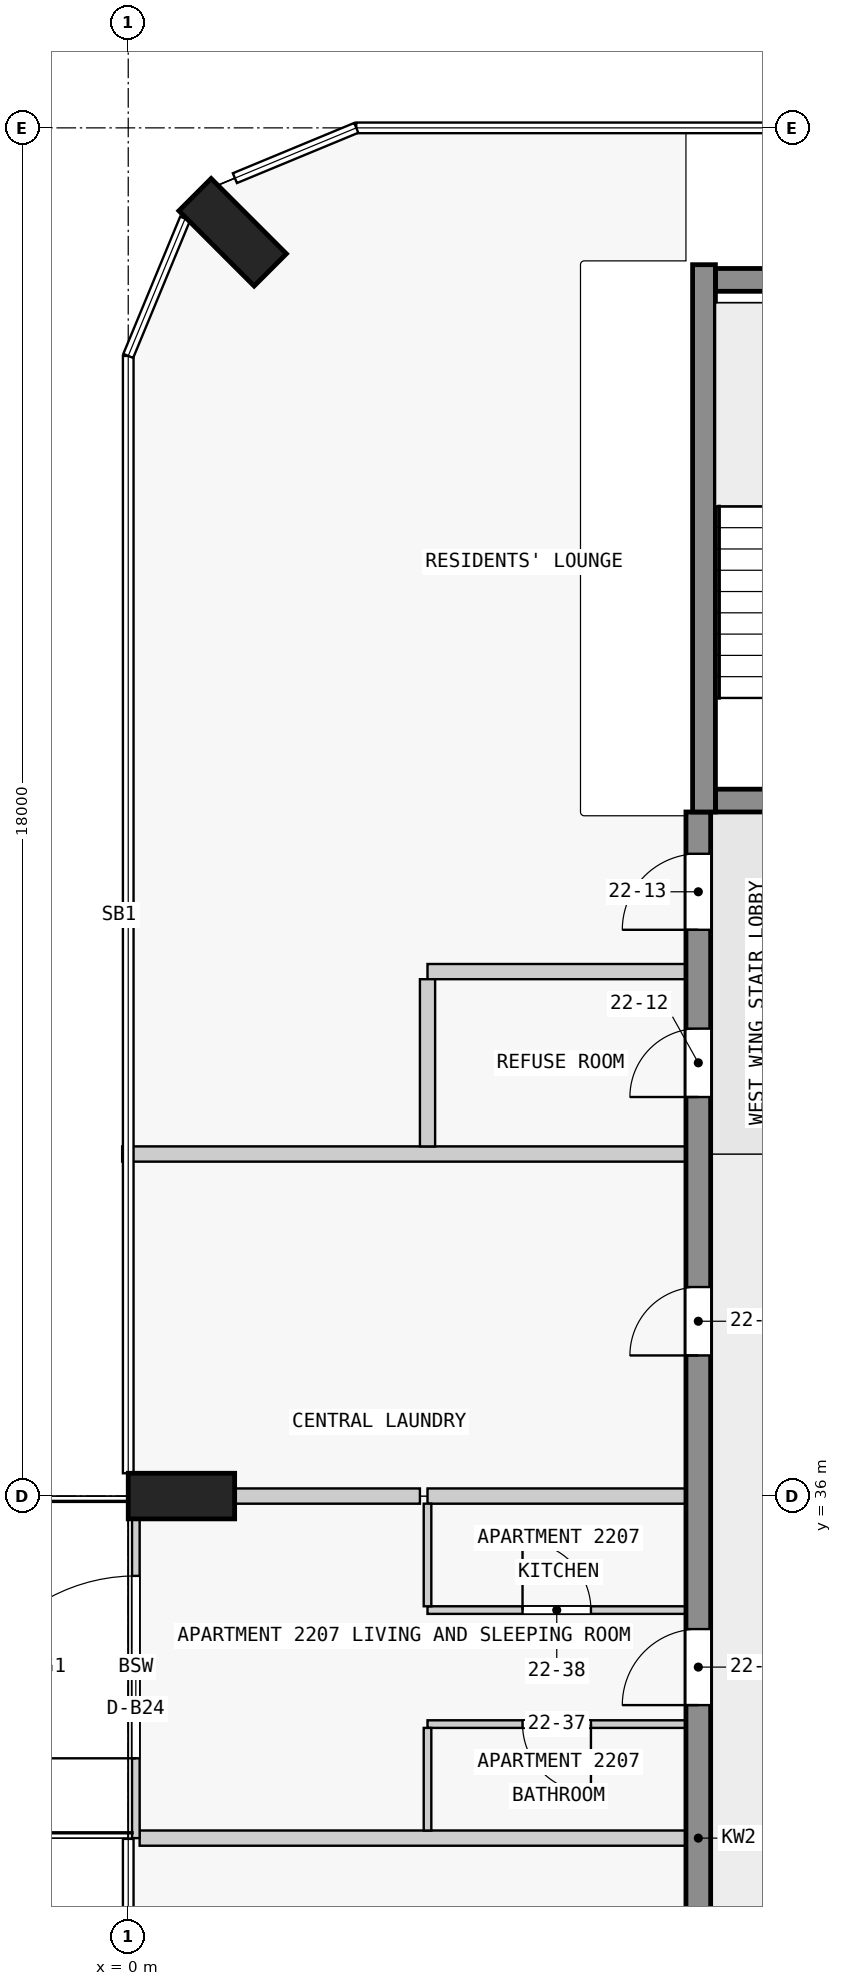
"""IFC4 building model, lengths in metres.
Left out: names, types, materials, properties, quantities, classifications, styles, units other than length and angle.
Written with IfcOpenShell. Run it as: python <this file> out.ifc"""

import sys

from ifc_helpers import new_model, si_unit, direction, frame, frame_2d, origin, origin_2d, place, context, subcontext, project, spatial, rectangle, extrude, element, fill, save


model = new_model("IFC4")
c1 = context("Model", 3, precision=1e-05, world=origin(), true_north=direction((0.0, 1.0)))
c2 = subcontext(c1, "Body", "Model", "MODEL_VIEW")
j1 = project(units=[si_unit("LENGTHUNIT", "METRE"), si_unit("PLANEANGLEUNIT", "RADIAN")], contexts=[c1])
p1 = place(None, origin())
s1 = spatial("IfcSite", under=j1, at=p1, CompositionType="ELEMENT")
p2 = place(p1, origin())
s2 = spatial("IfcBuilding", under=s1, at=p2, CompositionType="ELEMENT")
p3 = place(p2, frame((0.0, 0.0, 88.8)))
s3 = spatial("IfcBuildingStorey", under=s2, at=p3, CompositionType="ELEMENT", Elevation=88.8)
for number, where, z_axis, x_axis in (
    (1, (1.374, 52.626, 0.0), (0.0, 0.0, 1.0), (0.707, 0.707, 0.0)),
    (2, (0.7, 36.0, 0.0), (0.0, 0.0, 1.0), (0.0, 1.0, 0.0)),
):
    element("IfcColumn", number, at=place(p3, frame(where, z_axis=z_axis, x_axis=x_axis)), inside=s3, PredefinedType="COLUMN", context=c2, shape_type="SweptSolid", body=[
        extrude(rectangle(XDim=0.6, YDim=1.4, at=origin_2d()), origin(), (0.0, 0.0, 1.0), 3.5),
    ])
p4 = place(p3, frame((7.725, 45.15, 0.0), z_axis=(0.0, 0.0, 1.0), x_axis=(1.0, 0.0, 0.0)))
e3 = element("IfcWall", 3, at=p4, inside=s3, PredefinedType="SHEAR", context=c2, shape_type="SweptSolid", body=[
    extrude(rectangle(XDim=2.55, YDim=0.3, at=frame_2d((1.275, 0.0))), origin(), (0.0, 0.0, 1.0), 3.5),
])
p5 = place(p4, frame((0.725, 0.0, 0.0)))
e4 = element("IfcOpeningElement", 4, at=p5, cuts=e3, PredefinedType="OPENING", context=c2, shape_type="SweptSolid", body=[
    extrude(rectangle(XDim=1.1, YDim=2.1, at=frame_2d((0.55, 1.05))), frame((0.0, 0.16, 0.0), z_axis=(0.0, -1.0, 0.0), x_axis=(1.0, 0.0, 0.0)), (0.0, 0.0, 1.0), 0.32),
])
p6 = place(p3, frame((7.725, 52.0, 0.0), z_axis=(0.0, 0.0, 1.0), x_axis=(1.0, 0.0, 0.0)))
e5 = element("IfcWall", 5, at=p6, inside=s3, PredefinedType="SHEAR", context=c2, shape_type="SweptSolid", body=[
    extrude(rectangle(XDim=2.55, YDim=0.3, at=frame_2d((1.275, 0.0))), origin(), (0.0, 0.0, 1.0), 3.5),
])
p7 = place(p3, frame((7.575, 45.0, 0.0), z_axis=(0.0, 0.0, 1.0), x_axis=(0.0, 1.0, 0.0)))
e6 = element("IfcWall", 6, at=p7, inside=s3, PredefinedType="SHEAR", context=c2, shape_type="SweptSolid", body=[
    extrude(rectangle(XDim=7.2, YDim=0.3, at=frame_2d((3.6, 0.0))), origin(), (0.0, 0.0, 1.0), 3.5),
])
p8 = place(p3, frame((7.5, 18.0, 0.0), z_axis=(0.0, 0.0, 1.0), x_axis=(0.0, 1.0, 0.0)))
e7 = element("IfcWall", 7, at=p8, inside=s3, PredefinedType="SHEAR", context=c2, shape_type="SweptSolid", body=[
    extrude(rectangle(XDim=27.0, YDim=0.325, at=frame_2d((13.5, 0.0))), origin(), (0.0, 0.0, 1.0), 3.25),
])
p9 = place(p8, frame((1.75, 0.0, 0.0)))
e8 = element("IfcOpeningElement", 8, at=p9, cuts=e7, PredefinedType="OPENING", context=c2, shape_type="SweptSolid", body=[
    extrude(rectangle(XDim=1.0, YDim=2.1, at=frame_2d((0.5, 1.05))), frame((0.0, 0.172, 0.0), z_axis=(0.0, -1.0, 0.0), x_axis=(1.0, 0.0, 0.0)), (0.0, 0.0, 1.0), 0.345),
])
p10 = place(p8, frame((6.25, 0.0, 0.0)))
e9 = element("IfcOpeningElement", 9, at=p10, cuts=e7, PredefinedType="OPENING", context=c2, shape_type="SweptSolid", body=[
    extrude(rectangle(XDim=1.0, YDim=2.1, at=frame_2d((0.5, 1.05))), frame((0.0, 0.172, 0.0), z_axis=(0.0, -1.0, 0.0), x_axis=(1.0, 0.0, 0.0)), (0.0, 0.0, 1.0), 0.345),
])
p11 = place(p8, frame((10.85, 0.0, 0.0)))
e10 = element("IfcOpeningElement", 10, at=p11, cuts=e7, PredefinedType="OPENING", context=c2, shape_type="SweptSolid", body=[
    extrude(rectangle(XDim=0.9, YDim=2.1, at=frame_2d((0.45, 1.05))), frame((0.0, 0.172, 0.0), z_axis=(0.0, -1.0, 0.0), x_axis=(1.0, 0.0, 0.0)), (0.0, 0.0, 1.0), 0.345),
])
p12 = place(p8, frame((15.25, 0.0, 0.0)))
e11 = element("IfcOpeningElement", 11, at=p12, cuts=e7, PredefinedType="OPENING", context=c2, shape_type="SweptSolid", body=[
    extrude(rectangle(XDim=1.0, YDim=2.1, at=frame_2d((0.5, 1.05))), frame((0.0, 0.172, 0.0), z_axis=(0.0, -1.0, 0.0), x_axis=(1.0, 0.0, 0.0)), (0.0, 0.0, 1.0), 0.345),
])
p13 = place(p8, frame((19.85, 0.0, 0.0)))
e12 = element("IfcOpeningElement", 12, at=p13, cuts=e7, PredefinedType="OPENING", context=c2, shape_type="SweptSolid", body=[
    extrude(rectangle(XDim=0.9, YDim=2.1, at=frame_2d((0.45, 1.05))), frame((0.0, 0.172, 0.0), z_axis=(0.0, -1.0, 0.0), x_axis=(1.0, 0.0, 0.0)), (0.0, 0.0, 1.0), 0.345),
])
p14 = place(p8, frame((23.25, 0.0, 0.0)))
e13 = element("IfcOpeningElement", 13, at=p14, cuts=e7, PredefinedType="OPENING", context=c2, shape_type="SweptSolid", body=[
    extrude(rectangle(XDim=0.9, YDim=2.1, at=frame_2d((0.45, 1.05))), frame((0.0, 0.172, 0.0), z_axis=(0.0, -1.0, 0.0), x_axis=(1.0, 0.0, 0.0)), (0.0, 0.0, 1.0), 0.345),
])
p15 = place(p8, frame((25.45, 0.0, 0.0)))
e14 = element("IfcOpeningElement", 14, at=p15, cuts=e7, PredefinedType="OPENING", context=c2, shape_type="SweptSolid", body=[
    extrude(rectangle(XDim=1.0, YDim=2.1, at=frame_2d((0.5, 1.05))), frame((0.0, 0.172, 0.0), z_axis=(0.0, -1.0, 0.0), x_axis=(1.0, 0.0, 0.0)), (0.0, 0.0, 1.0), 0.345),
])
p16 = place(p3, frame((0.1, 31.5, 0.0), z_axis=(0.0, 0.0, 1.0), x_axis=(0.0, 1.0, 0.0)))
e15 = element("IfcWall", 15, at=p16, inside=s3, PredefinedType="STANDARD", context=c2, shape_type="SweptSolid", body=[
    extrude(rectangle(XDim=4.5, YDim=0.1, at=frame_2d((2.25, 0.0))), origin(), (0.0, 0.0, 1.0), 3.25),
])
p17 = place(p16, frame((1.05, 0.0, 0.0)))
e16 = element("IfcOpeningElement", 16, at=p17, cuts=e15, PredefinedType="OPENING", context=c2, shape_type="SweptSolid", body=[
    extrude(rectangle(XDim=2.4, YDim=2.4, at=frame_2d((1.2, 1.2))), frame((0.0, 0.06, 0.0), z_axis=(0.0, -1.0, 0.0), x_axis=(1.0, 0.0, 0.0)), (0.0, 0.0, 1.0), 0.12),
])
p18 = place(p3, frame((7.337, 31.5, 0.0), z_axis=(0.0, 0.0, 1.0), x_axis=(-1.0, 0.0, 0.0)))
e17 = element("IfcWall", 17, at=p18, inside=s3, PredefinedType="PARTITIONING", context=c2, shape_type="SweptSolid", body=[
    extrude(rectangle(XDim=7.188, YDim=0.2, at=frame_2d((3.594, 0.0))), origin(), (0.0, 0.0, 1.0), 3.25),
])
p19 = place(p3, frame((7.337, 33.0, 0.0), z_axis=(0.0, 0.0, 1.0), x_axis=(-1.0, 0.0, 0.0)))
e18 = element("IfcWall", 18, at=p19, inside=s3, PredefinedType="PARTITIONING", context=c2, shape_type="SweptSolid", body=[
    extrude(rectangle(XDim=3.4, YDim=0.1, at=frame_2d((1.7, 0.0))), origin(), (0.0, 0.0, 1.0), 3.25),
])
p20 = place(p19, frame((1.25, 0.0, 0.0)))
e19 = element("IfcOpeningElement", 19, at=p20, cuts=e18, PredefinedType="OPENING", context=c2, shape_type="SweptSolid", body=[
    extrude(rectangle(XDim=0.9, YDim=2.1, at=frame_2d((0.45, 1.05))), frame((0.0, 0.06, 0.0), z_axis=(0.0, -1.0, 0.0), x_axis=(1.0, 0.0, 0.0)), (0.0, 0.0, 1.0), 0.12),
])
p21 = place(p3, frame((3.938, 34.5, 0.0), z_axis=(0.0, 0.0, 1.0), x_axis=(1.0, 0.0, 0.0)))
e20 = element("IfcWall", 20, at=p21, inside=s3, PredefinedType="PARTITIONING", context=c2, shape_type="SweptSolid", body=[
    extrude(rectangle(XDim=3.4, YDim=0.1, at=frame_2d((1.7, 0.0))), origin(), (0.0, 0.0, 1.0), 3.25),
])
p22 = place(p21, frame((1.25, 0.0, 0.0)))
e21 = element("IfcOpeningElement", 21, at=p22, cuts=e20, PredefinedType="OPENING", context=c2, shape_type="SweptSolid", body=[
    extrude(rectangle(XDim=0.9, YDim=2.1, at=frame_2d((0.45, 1.05))), frame((0.0, 0.06, 0.0), z_axis=(0.0, -1.0, 0.0), x_axis=(1.0, 0.0, 0.0)), (0.0, 0.0, 1.0), 0.12),
])
p23 = place(p3, frame((7.337, 36.0, 0.0), z_axis=(0.0, 0.0, 1.0), x_axis=(-1.0, 0.0, 0.0)))
e22 = element("IfcWall", 22, at=p23, inside=s3, PredefinedType="PARTITIONING", context=c2, shape_type="SweptSolid", body=[
    extrude(rectangle(XDim=3.4, YDim=0.2, at=frame_2d((1.7, 0.0))), origin(), (0.0, 0.0, 1.0), 3.25),
])
p24 = place(p3, frame((1.4, 36.0, 0.0), z_axis=(0.0, 0.0, 1.0), x_axis=(1.0, 0.0, 0.0)))
e23 = element("IfcWall", 23, at=p24, inside=s3, PredefinedType="PARTITIONING", context=c2, shape_type="SweptSolid", body=[
    extrude(rectangle(XDim=2.438, YDim=0.2, at=frame_2d((1.219, 0.0))), origin(), (0.0, 0.0, 1.0), 3.25),
])
p25 = place(p3, frame((7.337, 40.5, 0.0), z_axis=(0.0, 0.0, 1.0), x_axis=(-1.0, 0.0, 0.0)))
e24 = element("IfcWall", 24, at=p25, inside=s3, PredefinedType="PARTITIONING", context=c2, shape_type="SweptSolid", body=[
    extrude(rectangle(XDim=7.417, YDim=0.2, at=frame_2d((3.709, 0.0))), origin(), (0.0, 0.0, 1.0), 3.25),
])
p26 = place(p3, frame((7.337, 42.9, 0.0), z_axis=(0.0, 0.0, 1.0), x_axis=(-1.0, 0.0, 0.0)))
e25 = element("IfcWall", 25, at=p26, inside=s3, PredefinedType="PARTITIONING", context=c2, shape_type="SweptSolid", body=[
    extrude(rectangle(XDim=3.4, YDim=0.2, at=frame_2d((1.7, 0.0))), origin(), (0.0, 0.0, 1.0), 3.25),
])
for number, where, z_axis, x_axis in (
    (26, (3.938, 32.95, 0.0), (0.0, 0.0, 1.0), (0.0, -1.0, 0.0)),
    (27, (3.938, 35.9, 0.0), (0.0, 0.0, 1.0), (0.0, -1.0, 0.0)),
):
    element("IfcWall", number, at=place(p3, frame(where, z_axis=z_axis, x_axis=x_axis)), inside=s3, PredefinedType="PARTITIONING", context=c2, shape_type="SweptSolid", body=[
        extrude(rectangle(XDim=1.35, YDim=0.1, at=frame_2d((0.675, 0.0))), origin(), (0.0, 0.0, 1.0), 3.25),
    ])
p27 = place(p3, frame((3.938, 42.8, 0.0), z_axis=(0.0, 0.0, 1.0), x_axis=(0.0, -1.0, 0.0)))
e28 = element("IfcWall", 28, at=p27, inside=s3, PredefinedType="PARTITIONING", context=c2, shape_type="SweptSolid", body=[
    extrude(rectangle(XDim=2.2, YDim=0.2, at=frame_2d((1.1, 0.0))), origin(), (0.0, 0.0, 1.0), 3.25),
])
p28 = place(p17, origin())
e29 = element("IfcDoor", 29, at=p28, inside=s3, OperationType="SINGLE_SWING_LEFT", PredefinedType="DOOR", context=c2, shape_type="SweptSolid", body=[
    extrude(rectangle(XDim=2.4, YDim=2.4, at=frame_2d((1.2, 1.2))), frame((0.0, 0.025, 0.0), z_axis=(0.0, -1.0, 0.0), x_axis=(1.0, 0.0, 0.0)), (0.0, 0.0, 1.0), 0.05),
])
fill(e16, e29)
p29 = place(p12, origin())
e30 = element("IfcDoor", 30, at=p29, inside=s3, OperationType="SINGLE_SWING_RIGHT", PredefinedType="DOOR", context=c2, shape_type="SweptSolid", body=[
    extrude(rectangle(XDim=1.0, YDim=2.1, at=frame_2d((0.5, 1.05))), frame((0.0, 0.025, 0.0), z_axis=(0.0, -1.0, 0.0), x_axis=(1.0, 0.0, 0.0)), (0.0, 0.0, 1.0), 0.05),
])
fill(e11, e30)
p30 = place(p13, origin())
e31 = element("IfcDoor", 31, at=p30, inside=s3, OperationType="SINGLE_SWING_RIGHT", PredefinedType="DOOR", context=c2, shape_type="SweptSolid", body=[
    extrude(rectangle(XDim=0.9, YDim=2.1, at=frame_2d((0.45, 1.05))), frame((0.0, 0.025, 0.0), z_axis=(0.0, -1.0, 0.0), x_axis=(1.0, 0.0, 0.0)), (0.0, 0.0, 1.0), 0.05),
])
fill(e12, e31)
p31 = place(p14, origin())
e32 = element("IfcDoor", 32, at=p31, inside=s3, OperationType="SINGLE_SWING_RIGHT", PredefinedType="DOOR", context=c2, shape_type="SweptSolid", body=[
    extrude(rectangle(XDim=0.9, YDim=2.1, at=frame_2d((0.45, 1.05))), frame((0.0, 0.025, 0.0), z_axis=(0.0, -1.0, 0.0), x_axis=(1.0, 0.0, 0.0)), (0.0, 0.0, 1.0), 0.05),
])
fill(e13, e32)
p32 = place(p15, origin())
e33 = element("IfcDoor", 33, at=p32, inside=s3, OperationType="SINGLE_SWING_RIGHT", PredefinedType="DOOR", context=c2, shape_type="SweptSolid", body=[
    extrude(rectangle(XDim=1.0, YDim=2.1, at=frame_2d((0.5, 1.05))), frame((0.0, 0.025, 0.0), z_axis=(0.0, -1.0, 0.0), x_axis=(1.0, 0.0, 0.0)), (0.0, 0.0, 1.0), 0.05),
])
fill(e14, e33)
p33 = place(p20, origin())
e34 = element("IfcDoor", 34, at=p33, inside=s3, OperationType="SINGLE_SWING_LEFT", PredefinedType="DOOR", context=c2, shape_type="SweptSolid", body=[
    extrude(rectangle(XDim=0.9, YDim=2.1, at=frame_2d((0.45, 1.05))), frame((0.0, 0.025, 0.0), z_axis=(0.0, -1.0, 0.0), x_axis=(1.0, 0.0, 0.0)), (0.0, 0.0, 1.0), 0.05),
])
fill(e19, e34)
p34 = place(p22, origin())
e35 = element("IfcDoor", 35, at=p34, inside=s3, OperationType="SINGLE_SWING_LEFT", PredefinedType="DOOR", context=c2, shape_type="SweptSolid", body=[
    extrude(rectangle(XDim=0.9, YDim=2.1, at=frame_2d((0.45, 1.05))), frame((0.0, 0.025, 0.0), z_axis=(0.0, -1.0, 0.0), x_axis=(1.0, 0.0, 0.0)), (0.0, 0.0, 1.0), 0.05),
])
fill(e21, e35)
save(model, sys.argv[1])
